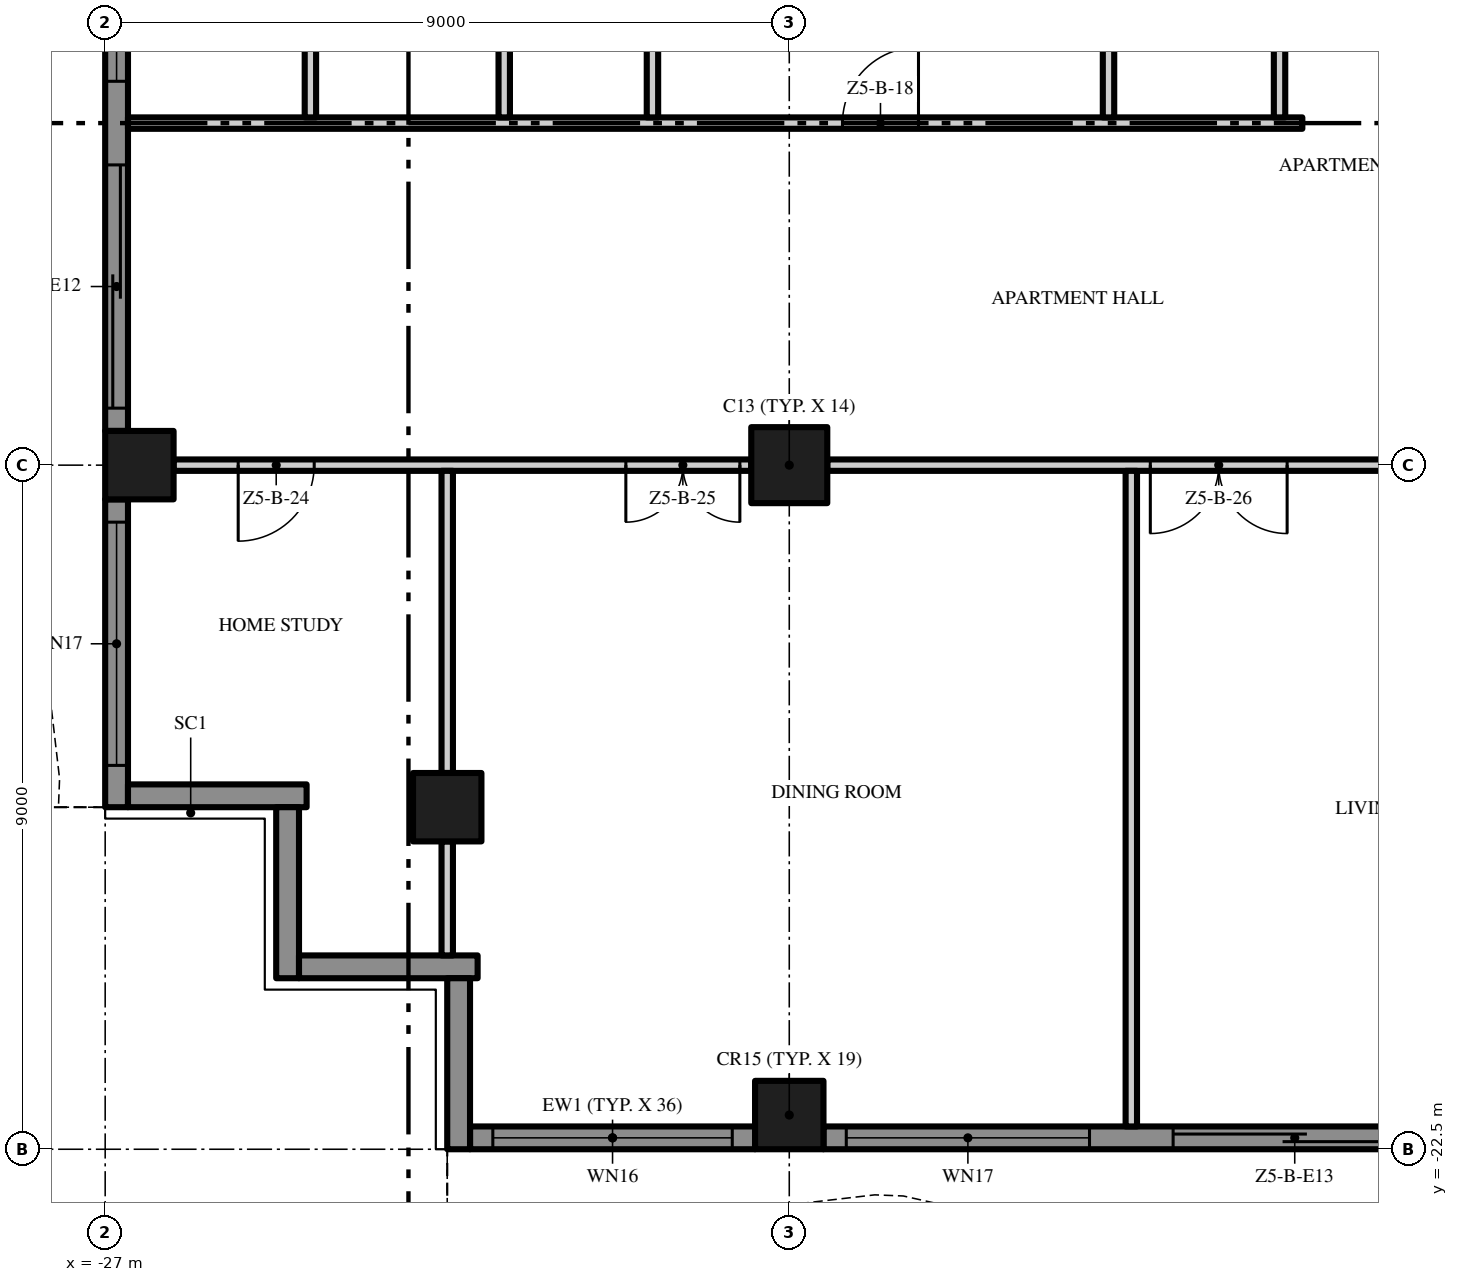
"""IFC4 building model, lengths in metres.
Left out: names, types, materials, properties, quantities, classifications, styles, units other than length and angle.
Written with IfcOpenShell. Run it as: python <this file> out.ifc"""

import sys

from ifc_helpers import new_model, si_unit, direction, frame, frame_2d, origin, origin_2d, place, context, subcontext, project, spatial, polyline, rectangle, outline, extrude, element, fill, save


model = new_model("IFC4")
c1 = context("Model", 3, precision=1e-05, world=origin(), true_north=direction((0.0, 1.0)))
c2 = subcontext(c1, "Body", "Model", "MODEL_VIEW")
j1 = project(units=[si_unit("LENGTHUNIT", "METRE"), si_unit("PLANEANGLEUNIT", "RADIAN")], contexts=[c1])
p1 = place(None, origin())
s1 = spatial("IfcSite", under=j1, at=p1, CompositionType="ELEMENT")
p2 = place(p1, origin())
s2 = spatial("IfcBuilding", under=s1, at=p2, CompositionType="ELEMENT")
p3 = place(p2, frame((0.0, 0.0, 254.0)))
s3 = spatial("IfcBuildingStorey", under=s2, at=p3, CompositionType="ELEMENT", Elevation=254.0)
p4 = place(p3, frame((-18.0, -13.5, 0.0), z_axis=(0.0, 0.0, 1.0), x_axis=(1.0, 0.0, 0.0)))
e1 = element("IfcColumn", 1, at=p4, inside=s3, PredefinedType="COLUMN", context=c2, shape_type="SweptSolid", body=[
    extrude(rectangle(XDim=1.0, YDim=1.0, at=origin_2d()), origin(), (0.0, 0.0, 1.0), 3.5),
])
for number, where, z_axis, x_axis in (
    (2, (-18.0, -22.05, 0.0), (0.0, 0.0, 1.0), (1.0, 0.0, 0.0)),
    (3, (-26.55, -13.5, 0.0), (0.0, 0.0, 1.0), (1.0, 0.0, 0.0)),
    (4, (-22.5, -18.0, 0.0), (0.0, 0.0, 1.0), (1.0, 0.0, 0.0)),
):
    element("IfcColumn", number, at=place(p3, frame(where, z_axis=z_axis, x_axis=x_axis)), inside=s3, PredefinedType="COLUMN", context=c2, shape_type="SweptSolid", body=[
        extrude(rectangle(XDim=0.9, YDim=0.9, at=origin_2d()), origin(), (0.0, 0.0, 1.0), 3.5),
    ])
p5 = place(p3, frame((-18.45, -22.35, 0.0), z_axis=(0.0, 0.0, 1.0), x_axis=(-1.0, 0.0, 0.0)))
e5 = element("IfcWall", 5, at=p5, inside=s3, PredefinedType="SOLIDWALL", context=c2, shape_type="SweptSolid", body=[
    extrude(rectangle(XDim=3.75, YDim=0.3, at=frame_2d((1.875, 0.0))), origin(), (0.0, 0.0, 1.0), 3.5),
])
p6 = place(p5, frame((0.3, 0.0, 0.45)))
e6 = element("IfcOpeningElement", 6, at=p6, cuts=e5, PredefinedType="OPENING", context=c2, shape_type="SweptSolid", body=[
    extrude(rectangle(XDim=3.15, YDim=2.65, at=frame_2d((1.575, 1.325))), frame((0.0, 0.16, 0.0), z_axis=(0.0, -1.0, 0.0), x_axis=(1.0, 0.0, 0.0)), (0.0, 0.0, 1.0), 0.32),
])
p7 = place(p3, frame((-9.45, -22.35, 0.0), z_axis=(0.0, 0.0, 1.0), x_axis=(-1.0, 0.0, 0.0)))
e7 = element("IfcWall", 7, at=p7, inside=s3, PredefinedType="SOLIDWALL", context=c2, shape_type="SweptSolid", body=[
    extrude(rectangle(XDim=8.1, YDim=0.3, at=frame_2d((4.05, 0.0))), origin(), (0.0, 0.0, 1.0), 3.5),
])
p8 = place(p7, frame((4.6, 0.0, 0.45)))
e8 = element("IfcOpeningElement", 8, at=p8, cuts=e7, PredefinedType="OPENING", context=c2, shape_type="SweptSolid", body=[
    extrude(rectangle(XDim=3.2, YDim=2.65, at=frame_2d((1.6, 1.325))), frame((0.0, 0.16, 0.0), z_axis=(0.0, -1.0, 0.0), x_axis=(1.0, 0.0, 0.0)), (0.0, 0.0, 1.0), 0.32),
])
p9 = place(p7, frame((0.3, 0.0, 0.0)))
e9 = element("IfcOpeningElement", 9, at=p9, cuts=e7, PredefinedType="OPENING", context=c2, shape_type="SweptSolid", body=[
    extrude(rectangle(XDim=3.2, YDim=2.4, at=frame_2d((1.6, 1.2))), frame((0.0, 0.16, 0.0), z_axis=(0.0, -1.0, 0.0), x_axis=(1.0, 0.0, 0.0)), (0.0, 0.0, 1.0), 0.32),
])
p10 = place(p3, frame((-26.85, -13.05, 0.0), z_axis=(0.0, 0.0, 1.0), x_axis=(0.0, 1.0, 0.0)))
e10 = element("IfcWall", 10, at=p10, inside=s3, PredefinedType="SOLIDWALL", context=c2, shape_type="SweptSolid", body=[
    extrude(rectangle(XDim=8.1, YDim=0.3, at=frame_2d((4.05, 0.0))), origin(), (0.0, 0.0, 1.0), 3.5),
])
p11 = place(p10, frame((4.6, 0.0, 0.45)))
e11 = element("IfcOpeningElement", 11, at=p11, cuts=e10, PredefinedType="OPENING", context=c2, shape_type="SweptSolid", body=[
    extrude(rectangle(XDim=3.2, YDim=2.65, at=frame_2d((1.6, 1.325))), frame((0.0, 0.16, 0.0), z_axis=(0.0, -1.0, 0.0), x_axis=(1.0, 0.0, 0.0)), (0.0, 0.0, 1.0), 0.32),
])
p12 = place(p10, frame((0.3, 0.0, 0.0)))
e12 = element("IfcOpeningElement", 12, at=p12, cuts=e10, PredefinedType="OPENING", context=c2, shape_type="SweptSolid", body=[
    extrude(rectangle(XDim=3.2, YDim=2.4, at=frame_2d((1.6, 1.2))), frame((0.0, 0.16, 0.0), z_axis=(0.0, -1.0, 0.0), x_axis=(1.0, 0.0, 0.0)), (0.0, 0.0, 1.0), 0.32),
])
p13 = place(p3, frame((-26.85, -18.0, 0.0), z_axis=(0.0, 0.0, 1.0), x_axis=(0.0, 1.0, 0.0)))
e13 = element("IfcWall", 13, at=p13, inside=s3, PredefinedType="SOLIDWALL", context=c2, shape_type="SweptSolid", body=[
    extrude(rectangle(XDim=4.05, YDim=0.3, at=frame_2d((2.025, 0.0))), origin(), (0.0, 0.0, 1.0), 3.5),
])
p14 = place(p13, frame((0.55, 0.0, 0.45)))
e14 = element("IfcOpeningElement", 14, at=p14, cuts=e13, PredefinedType="OPENING", context=c2, shape_type="SweptSolid", body=[
    extrude(rectangle(XDim=3.2, YDim=2.65, at=frame_2d((1.6, 1.325))), frame((0.0, 0.16, 0.0), z_axis=(0.0, -1.0, 0.0), x_axis=(1.0, 0.0, 0.0)), (0.0, 0.0, 1.0), 0.32),
])
p15 = place(p3, frame((-24.35, -17.85, 0.0), z_axis=(0.0, 0.0, 1.0), x_axis=(-1.0, 0.0, 0.0)))
e15 = element("IfcWall", 15, at=p15, inside=s3, PredefinedType="SOLIDWALL", context=c2, shape_type="SweptSolid", body=[
    extrude(rectangle(XDim=2.35, YDim=0.3, at=frame_2d((1.175, 0.0))), origin(), (0.0, 0.0, 1.0), 3.5),
])
p16 = place(p3, frame((-24.6, -20.25, 0.0), z_axis=(0.0, 0.0, 1.0), x_axis=(0.0, 1.0, 0.0)))
e16 = element("IfcWall", 16, at=p16, inside=s3, PredefinedType="SOLIDWALL", context=c2, shape_type="SweptSolid", body=[
    extrude(rectangle(XDim=2.25, YDim=0.3, at=frame_2d((1.125, 0.0))), origin(), (0.0, 0.0, 1.0), 3.5),
])
p17 = place(p3, frame((-22.1, -20.1, 0.0), z_axis=(0.0, 0.0, 1.0), x_axis=(-1.0, 0.0, 0.0)))
e17 = element("IfcWall", 17, at=p17, inside=s3, PredefinedType="SOLIDWALL", context=c2, shape_type="SweptSolid", body=[
    extrude(rectangle(XDim=2.35, YDim=0.3, at=frame_2d((1.175, 0.0))), origin(), (0.0, 0.0, 1.0), 3.5),
])
p18 = place(p3, frame((-22.35, -22.5, 0.0), z_axis=(0.0, 0.0, 1.0), x_axis=(0.0, 1.0, 0.0)))
e18 = element("IfcWall", 18, at=p18, inside=s3, PredefinedType="SOLIDWALL", context=c2, shape_type="SweptSolid", body=[
    extrude(rectangle(XDim=2.25, YDim=0.3, at=frame_2d((1.125, 0.0))), origin(), (0.0, 0.0, 1.0), 3.5),
])
p19 = place(p3, origin())
e19 = element("IfcWall", 19, at=p19, inside=s3, PredefinedType="USERDEFINED", context=c2, shape_type="SweptSolid", body=[
    extrude(outline(polyline([(-22.5, -25.149), (-21.0, -24.488), (-19.5, -23.755), (-18.0, -23.231), (-16.875, -23.1), (-16.5, -23.115), (-15.0, -23.451), (-13.5, -24.112), (-12.0, -24.845), (-10.5, -25.369), (-9.375, -25.5), (-9.0, -25.485), (-7.5, -25.149), (-6.0, -24.488), (-4.5, -23.755), (-3.0, -23.231), (-1.875, -23.1), (-1.5, -23.115), (0.0, -23.451), (1.5, -24.112), (3.0, -24.845), (4.5, -25.369), (5.625, -25.5), (6.0, -25.485), (7.5, -25.149), (9.0, -24.488), (10.5, -23.755), (12.0, -23.231), (13.125, -23.1), (13.5, -23.115), (15.0, -23.451), (16.5, -24.112), (18.0, -24.845), (19.5, -25.369), (20.625, -25.5), (21.0, -25.485), (22.5, -25.149), (22.445, -24.905), (20.967, -25.236), (20.635, -25.249), (19.556, -25.124), (18.096, -24.614), (16.605, -23.885), (15.079, -23.213), (13.533, -22.866), (13.115, -22.849), (11.944, -22.986), (10.404, -23.524), (8.895, -24.261), (7.421, -24.91), (5.967, -25.236), (5.635, -25.249), (4.556, -25.124), (3.096, -24.614), (1.605, -23.885), (0.079, -23.213), (-1.467, -22.866), (-1.885, -22.849), (-3.056, -22.986), (-4.596, -23.524), (-6.105, -24.261), (-7.579, -24.91), (-9.033, -25.236), (-9.365, -25.249), (-10.444, -25.124), (-11.904, -24.614), (-13.395, -23.885), (-14.921, -23.213), (-16.467, -22.866), (-16.885, -22.849), (-18.056, -22.986), (-19.596, -23.524), (-21.105, -24.261), (-22.601, -24.92), (-22.5, -25.149)])), origin(), (0.0, 0.0, 1.0), 0.9),
])
p20 = place(p3, origin())
e20 = element("IfcWall", 20, at=p20, inside=s3, PredefinedType="USERDEFINED", context=c2, shape_type="SweptSolid", body=[
    extrude(outline(polyline([(-29.649, 18.0), (-28.988, 16.5), (-28.255, 15.0), (-27.731, 13.5), (-27.6, 12.375), (-27.615, 12.0), (-27.951, 10.5), (-28.612, 9.0), (-29.345, 7.5), (-29.869, 6.0), (-30.0, 4.875), (-29.985, 4.5), (-29.649, 3.0), (-28.988, 1.5), (-28.255, 0.0), (-27.731, -1.5), (-27.6, -2.625), (-27.615, -3.0), (-27.951, -4.5), (-28.612, -6.0), (-29.345, -7.5), (-29.869, -9.0), (-30.0, -10.125), (-29.985, -10.5), (-29.649, -12.0), (-28.988, -13.5), (-28.255, -15.0), (-27.731, -16.5), (-27.6, -17.625), (-27.615, -18.0), (-27.365, -18.01), (-27.349, -17.615), (-27.486, -16.444), (-28.024, -14.904), (-28.761, -13.395), (-29.41, -11.921), (-29.736, -10.467), (-29.749, -10.135), (-29.624, -9.056), (-29.114, -7.596), (-28.385, -6.105), (-27.713, -4.579), (-27.366, -3.033), (-27.349, -2.615), (-27.486, -1.444), (-28.024, 0.096), (-28.761, 1.605), (-29.41, 3.079), (-29.736, 4.533), (-29.749, 4.865), (-29.624, 5.944), (-29.114, 7.404), (-28.385, 8.895), (-27.713, 10.421), (-27.366, 11.967), (-27.349, 12.385), (-27.486, 13.556), (-28.024, 15.096), (-28.761, 16.605), (-29.42, 18.101), (-29.649, 18.0)])), origin(), (0.0, 0.0, 1.0), 0.9),
])
p21 = place(p3, frame((-18.5, -13.5, 0.0), z_axis=(0.0, 0.0, 1.0), x_axis=(-1.0, 0.0, 0.0)))
e21 = element("IfcWall", 21, at=p21, inside=s3, PredefinedType="PARTITIONING", context=c2, shape_type="SweptSolid", body=[
    extrude(rectangle(XDim=7.6, YDim=0.15, at=frame_2d((3.8, 0.0))), origin(), (0.0, 0.0, 1.0), 3.5),
])
p22 = place(p21, frame((5.75, 0.0, 0.0)))
e22 = element("IfcOpeningElement", 22, at=p22, cuts=e21, PredefinedType="OPENING", context=c2, shape_type="SweptSolid", body=[
    extrude(rectangle(XDim=1.0, YDim=2.4, at=frame_2d((0.5, 1.2))), frame((0.0, 0.085, 0.0), z_axis=(0.0, -1.0, 0.0), x_axis=(1.0, 0.0, 0.0)), (0.0, 0.0, 1.0), 0.17),
])
p23 = place(p21, frame((0.15, 0.0, 0.0)))
e23 = element("IfcOpeningElement", 23, at=p23, cuts=e21, PredefinedType="OPENING", context=c2, shape_type="SweptSolid", body=[
    extrude(rectangle(XDim=1.5, YDim=2.4, at=frame_2d((0.75, 1.2))), frame((0.0, 0.085, 0.0), z_axis=(0.0, -1.0, 0.0), x_axis=(1.0, 0.0, 0.0)), (0.0, 0.0, 1.0), 0.17),
])
p24 = place(p3, frame((-9.5, -13.5, 0.0), z_axis=(0.0, 0.0, 1.0), x_axis=(-1.0, 0.0, 0.0)))
e24 = element("IfcWall", 24, at=p24, inside=s3, PredefinedType="PARTITIONING", context=c2, shape_type="SweptSolid", body=[
    extrude(rectangle(XDim=8.0, YDim=0.15, at=frame_2d((4.0, 0.0))), origin(), (0.0, 0.0, 1.0), 3.5),
])
p25 = place(p24, frame((1.95, 0.0, 0.0)))
e25 = element("IfcOpeningElement", 25, at=p25, cuts=e24, PredefinedType="OPENING", context=c2, shape_type="SweptSolid", body=[
    extrude(rectangle(XDim=1.8, YDim=2.4, at=frame_2d((0.9, 1.2))), frame((0.0, 0.085, 0.0), z_axis=(0.0, -1.0, 0.0), x_axis=(1.0, 0.0, 0.0)), (0.0, 0.0, 1.0), 0.17),
])
p26 = place(p3, frame((-26.7, -9.0, 0.0), z_axis=(0.0, 0.0, 1.0), x_axis=(1.0, 0.0, 0.0)))
e26 = element("IfcWall", 26, at=p26, inside=s3, PredefinedType="PARTITIONING", context=c2, shape_type="SweptSolid", body=[
    extrude(rectangle(XDim=15.45, YDim=0.15, at=frame_2d((7.725, 0.0))), origin(), (0.0, 0.0, 1.0), 3.5),
])
p27 = place(p26, frame((9.4, 0.0, 0.0)))
e27 = element("IfcOpeningElement", 27, at=p27, cuts=e26, PredefinedType="OPENING", context=c2, shape_type="SweptSolid", body=[
    extrude(rectangle(XDim=1.0, YDim=2.4, at=frame_2d((0.5, 1.2))), frame((0.0, 0.085, 0.0), z_axis=(0.0, -1.0, 0.0), x_axis=(1.0, 0.0, 0.0)), (0.0, 0.0, 1.0), 0.17),
])
p28 = place(p3, frame((-24.3, -8.925, 0.0), z_axis=(0.0, 0.0, 1.0), x_axis=(0.0, 1.0, 0.0)))
e28 = element("IfcWall", 28, at=p28, inside=s3, PredefinedType="PARTITIONING", context=c2, shape_type="SweptSolid", body=[
    extrude(rectangle(XDim=4.35, YDim=0.15, at=frame_2d((2.175, 0.0))), origin(), (0.0, 0.0, 1.0), 3.5),
])
p29 = place(p3, frame((-22.5, -19.95, 0.0), z_axis=(0.0, 0.0, 1.0), x_axis=(0.0, 1.0, 0.0)))
e29 = element("IfcWall", 29, at=p29, inside=s3, PredefinedType="PARTITIONING", context=c2, shape_type="SweptSolid", body=[
    extrude(rectangle(XDim=1.5, YDim=0.15, at=frame_2d((0.75, 0.0))), origin(), (0.0, 0.0, 1.0), 3.5),
])
p30 = place(p3, frame((-22.5, -17.55, 0.0), z_axis=(0.0, 0.0, 1.0), x_axis=(0.0, 1.0, 0.0)))
e30 = element("IfcWall", 30, at=p30, inside=s3, PredefinedType="PARTITIONING", context=c2, shape_type="SweptSolid", body=[
    extrude(rectangle(XDim=3.975, YDim=0.15, at=frame_2d((1.988, 0.0))), origin(), (0.0, 0.0, 1.0), 3.5),
])
for number, where, z_axis, x_axis in (
    (31, (-21.75, -8.925, 0.0), (0.0, 0.0, 1.0), (0.0, 1.0, 0.0)),
    (32, (-19.8, -8.925, 0.0), (0.0, 0.0, 1.0), (0.0, 1.0, 0.0)),
    (33, (-13.8, -8.925, 0.0), (0.0, 0.0, 1.0), (0.0, 1.0, 0.0)),
):
    element("IfcWall", number, at=place(p3, frame(where, z_axis=z_axis, x_axis=x_axis)), inside=s3, PredefinedType="PARTITIONING", context=c2, shape_type="SweptSolid", body=[
        extrude(rectangle(XDim=4.35, YDim=0.15, at=frame_2d((2.175, 0.0))), origin(), (0.0, 0.0, 1.0), 3.5),
    ])
p31 = place(p3, frame((-13.5, -22.2, 0.0), z_axis=(0.0, 0.0, 1.0), x_axis=(0.0, 1.0, 0.0)))
e34 = element("IfcWall", 34, at=p31, inside=s3, PredefinedType="PARTITIONING", context=c2, shape_type="SweptSolid", body=[
    extrude(rectangle(XDim=8.625, YDim=0.15, at=frame_2d((4.312, 0.0))), origin(), (0.0, 0.0, 1.0), 3.5),
])
p32 = place(p3, frame((-11.55, -8.925, 0.0), z_axis=(0.0, 0.0, 1.0), x_axis=(0.0, 1.0, 0.0)))
e35 = element("IfcWall", 35, at=p32, inside=s3, PredefinedType="PARTITIONING", context=c2, shape_type="SweptSolid", body=[
    extrude(rectangle(XDim=4.5, YDim=0.15, at=frame_2d((2.25, 0.0))), origin(), (0.0, 0.0, 1.0), 3.5),
])
p33 = place(p32, frame((1.75, 0.0, 0.0)))
e36 = element("IfcOpeningElement", 36, at=p33, cuts=e35, PredefinedType="OPENING", context=c2, shape_type="SweptSolid", body=[
    extrude(rectangle(XDim=0.9, YDim=2.1, at=frame_2d((0.45, 1.05))), frame((0.0, 0.085, 0.0), z_axis=(0.0, -1.0, 0.0), x_axis=(1.0, 0.0, 0.0)), (0.0, 0.0, 1.0), 0.17),
])
p34 = place(p6, origin())
e37 = element("IfcWindow", 37, at=p34, inside=s3, PartitioningType="SINGLE_PANEL", PredefinedType="WINDOW", context=c2, shape_type="SweptSolid", body=[
    extrude(rectangle(XDim=3.15, YDim=2.65, at=frame_2d((1.575, 1.325))), frame((0.0, 0.03, 0.0), z_axis=(0.0, -1.0, 0.0), x_axis=(1.0, 0.0, 0.0)), (0.0, 0.0, 1.0), 0.06),
])
fill(e6, e37)
p35 = place(p8, origin())
e38 = element("IfcWindow", 38, at=p35, inside=s3, PartitioningType="SINGLE_PANEL", PredefinedType="WINDOW", context=c2, shape_type="SweptSolid", body=[
    extrude(rectangle(XDim=3.2, YDim=2.65, at=frame_2d((1.6, 1.325))), frame((0.0, 0.03, 0.0), z_axis=(0.0, -1.0, 0.0), x_axis=(1.0, 0.0, 0.0)), (0.0, 0.0, 1.0), 0.06),
])
fill(e8, e38)
p36 = place(p9, origin())
e39 = element("IfcDoor", 39, at=p36, inside=s3, OperationType="SINGLE_SWING_LEFT", PredefinedType="DOOR", context=c2, shape_type="SweptSolid", body=[
    extrude(rectangle(XDim=3.2, YDim=2.4, at=frame_2d((1.6, 1.2))), frame((0.0, 0.025, 0.0), z_axis=(0.0, -1.0, 0.0), x_axis=(1.0, 0.0, 0.0)), (0.0, 0.0, 1.0), 0.05),
])
fill(e9, e39)
p37 = place(p11, origin())
e40 = element("IfcWindow", 40, at=p37, inside=s3, PartitioningType="SINGLE_PANEL", PredefinedType="WINDOW", context=c2, shape_type="SweptSolid", body=[
    extrude(rectangle(XDim=3.2, YDim=2.65, at=frame_2d((1.6, 1.325))), frame((0.0, 0.03, 0.0), z_axis=(0.0, -1.0, 0.0), x_axis=(1.0, 0.0, 0.0)), (0.0, 0.0, 1.0), 0.06),
])
fill(e11, e40)
p38 = place(p12, origin())
e41 = element("IfcDoor", 41, at=p38, inside=s3, OperationType="SINGLE_SWING_LEFT", PredefinedType="DOOR", context=c2, shape_type="SweptSolid", body=[
    extrude(rectangle(XDim=3.2, YDim=2.4, at=frame_2d((1.6, 1.2))), frame((0.0, 0.025, 0.0), z_axis=(0.0, -1.0, 0.0), x_axis=(1.0, 0.0, 0.0)), (0.0, 0.0, 1.0), 0.05),
])
fill(e12, e41)
p39 = place(p14, origin())
e42 = element("IfcWindow", 42, at=p39, inside=s3, PartitioningType="SINGLE_PANEL", PredefinedType="WINDOW", context=c2, shape_type="SweptSolid", body=[
    extrude(rectangle(XDim=3.2, YDim=2.65, at=frame_2d((1.6, 1.325))), frame((0.0, 0.03, 0.0), z_axis=(0.0, -1.0, 0.0), x_axis=(1.0, 0.0, 0.0)), (0.0, 0.0, 1.0), 0.06),
])
fill(e14, e42)
p40 = place(p27, origin())
e43 = element("IfcDoor", 43, at=p40, inside=s3, OperationType="SINGLE_SWING_RIGHT", PredefinedType="DOOR", context=c2, shape_type="SweptSolid", body=[
    extrude(rectangle(XDim=1.0, YDim=2.4, at=frame_2d((0.5, 1.2))), frame((0.0, 0.025, 0.0), z_axis=(0.0, -1.0, 0.0), x_axis=(1.0, 0.0, 0.0)), (0.0, 0.0, 1.0), 0.05),
])
fill(e27, e43)
p41 = place(p22, origin())
e44 = element("IfcDoor", 44, at=p41, inside=s3, OperationType="SINGLE_SWING_RIGHT", PredefinedType="DOOR", context=c2, shape_type="SweptSolid", body=[
    extrude(rectangle(XDim=1.0, YDim=2.4, at=frame_2d((0.5, 1.2))), frame((0.0, 0.025, 0.0), z_axis=(0.0, -1.0, 0.0), x_axis=(1.0, 0.0, 0.0)), (0.0, 0.0, 1.0), 0.05),
])
fill(e22, e44)
p42 = place(p23, origin())
e45 = element("IfcDoor", 45, at=p42, inside=s3, OperationType="DOUBLE_DOOR_SINGLE_SWING", PredefinedType="DOOR", context=c2, shape_type="SweptSolid", body=[
    extrude(rectangle(XDim=1.5, YDim=2.4, at=frame_2d((0.75, 1.2))), frame((0.0, 0.025, 0.0), z_axis=(0.0, -1.0, 0.0), x_axis=(1.0, 0.0, 0.0)), (0.0, 0.0, 1.0), 0.05),
])
fill(e23, e45)
p43 = place(p25, origin())
e46 = element("IfcDoor", 46, at=p43, inside=s3, OperationType="DOUBLE_DOOR_SINGLE_SWING", PredefinedType="DOOR", context=c2, shape_type="SweptSolid", body=[
    extrude(rectangle(XDim=1.8, YDim=2.4, at=frame_2d((0.9, 1.2))), frame((0.0, 0.025, 0.0), z_axis=(0.0, -1.0, 0.0), x_axis=(1.0, 0.0, 0.0)), (0.0, 0.0, 1.0), 0.05),
])
fill(e25, e46)
save(model, sys.argv[1])
